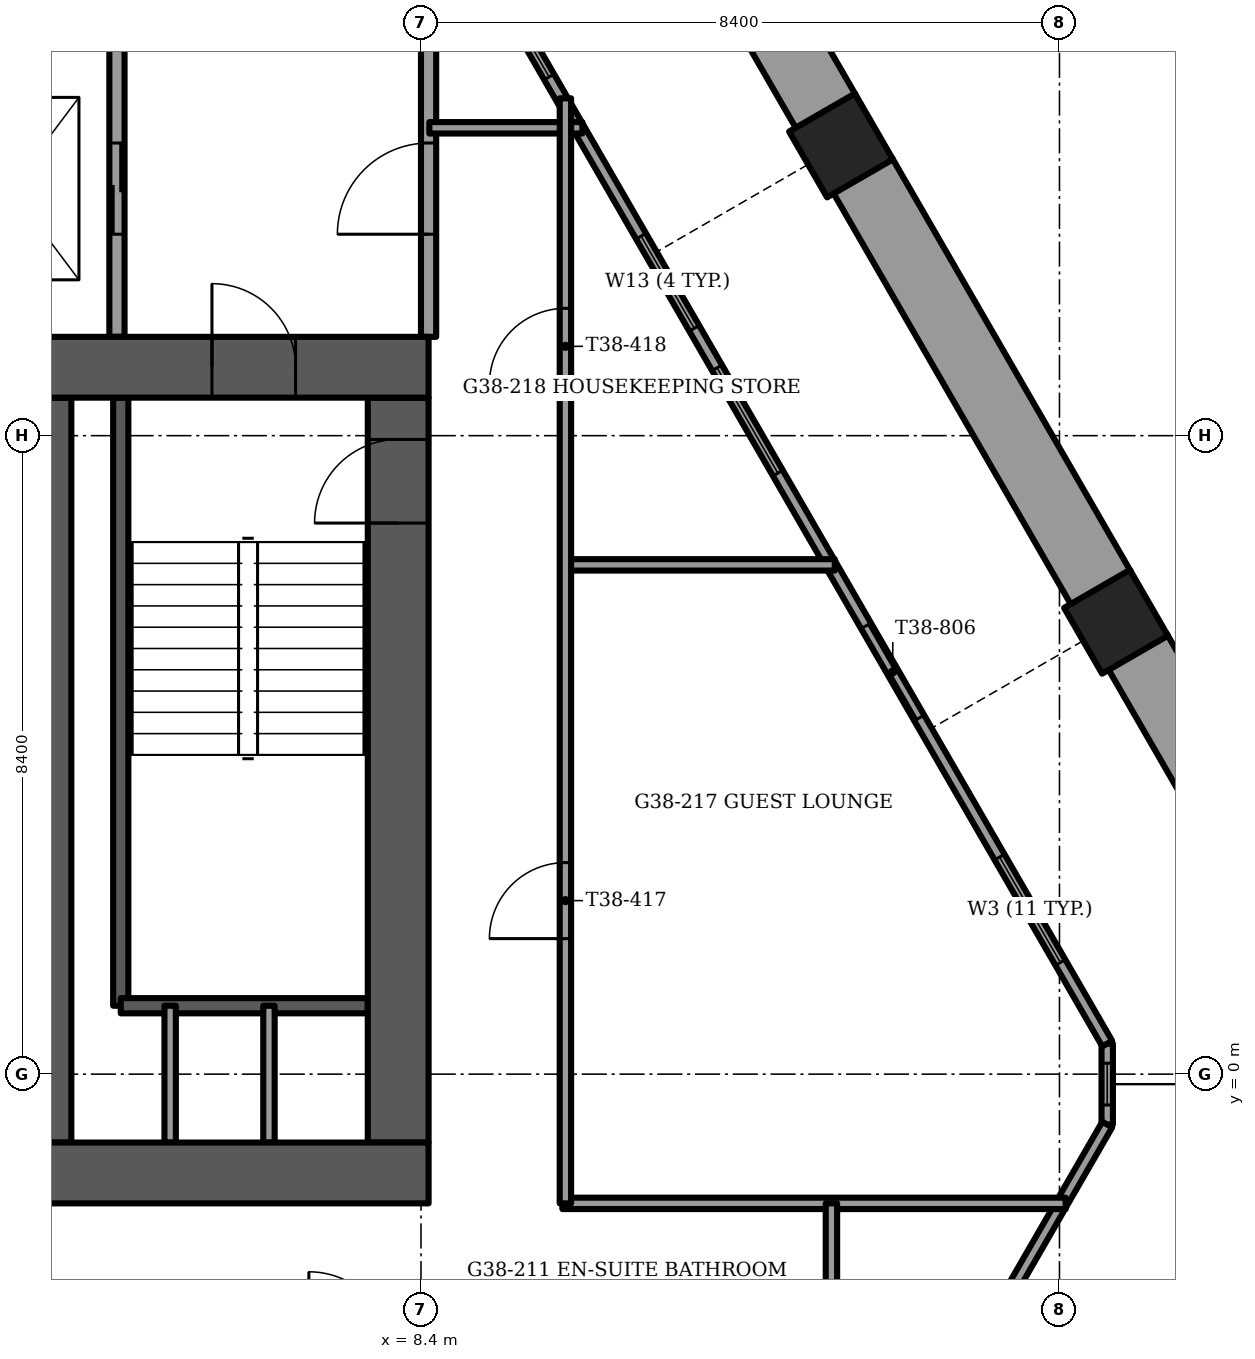
"""IFC4 building model, lengths in metres.
Left out: names, types, materials, properties, quantities, classifications, styles, units other than length and angle.
Written with IfcOpenShell. Run it as: python <this file> out.ifc"""

import sys

from ifc_helpers import new_model, si_unit, direction, frame, frame_2d, origin, origin_2d, place, context, subcontext, project, spatial, rectangle, extrude, element, fill, save


model = new_model("IFC4")
c1 = context("Model", 3, precision=1e-05, world=origin(), true_north=direction((0.0, 1.0)))
c2 = subcontext(c1, "Body", "Model", "MODEL_VIEW")
j1 = project(units=[si_unit("LENGTHUNIT", "METRE"), si_unit("PLANEANGLEUNIT", "RADIAN")], contexts=[c1])
p1 = place(None, origin())
s1 = spatial("IfcSite", under=j1, at=p1, CompositionType="ELEMENT")
p2 = place(p1, origin())
s2 = spatial("IfcBuilding", under=s1, at=p2, CompositionType="ELEMENT")
p3 = place(p2, frame((0.0, 0.0, 157.0)))
s3 = spatial("IfcBuildingStorey", under=s2, at=p3, CompositionType="ELEMENT", Elevation=157.0)
for number, where, z_axis, x_axis in (
    (1, (17.544, 5.951, -1.2), (0.0, 0.0, 1.0), (0.5, -0.866, 0.0)),
    (2, (13.926, 12.218, -1.2), (0.0, 0.0, 1.0), (0.5, -0.866, 0.0)),
):
    element("IfcColumn", number, at=place(p3, frame(where, z_axis=z_axis, x_axis=x_axis)), inside=s3, PredefinedType="COLUMN", context=c2, shape_type="SweptSolid", body=[
        extrude(rectangle(XDim=1.0, YDim=1.0, at=origin_2d()), origin(), (0.0, 0.0, 1.0), 3.75),
    ])
p4 = place(p3, frame((-8.5, -1.3, -0.3), z_axis=(0.0, 0.0, 1.0), x_axis=(1.0, 0.0, 0.0)))
e3 = element("IfcWall", 3, at=p4, inside=s3, PredefinedType="SHEAR", context=c2, shape_type="SweptSolid", body=[
    extrude(rectangle(XDim=17.0, YDim=0.8, at=frame_2d((8.5, 0.0))), origin(), (0.0, 0.0, 1.0), 3.75),
])
p5 = place(p4, frame((7.7, 0.0, 0.0)))
e4 = element("IfcOpeningElement", 4, at=p5, cuts=e3, PredefinedType="OPENING", context=c2, shape_type="SweptSolid", body=[
    extrude(rectangle(XDim=1.6, YDim=2.1, at=frame_2d((0.8, 1.05))), frame((0.0, 0.4, 0.0), z_axis=(0.0, -1.0, 0.0), x_axis=(1.0, 0.0, 0.0)), (0.0, 0.0, 1.0), 0.8),
])
p6 = place(p3, frame((-8.5, 9.3, -0.3), z_axis=(0.0, 0.0, 1.0), x_axis=(1.0, 0.0, 0.0)))
e5 = element("IfcWall", 5, at=p6, inside=s3, PredefinedType="SHEAR", context=c2, shape_type="SweptSolid", body=[
    extrude(rectangle(XDim=17.0, YDim=0.8, at=frame_2d((8.5, 0.0))), origin(), (0.0, 0.0, 1.0), 3.75),
])
p7 = place(p6, frame((7.7, 0.0, 0.0)))
e6 = element("IfcOpeningElement", 6, at=p7, cuts=e5, PredefinedType="OPENING", context=c2, shape_type="SweptSolid", body=[
    extrude(rectangle(XDim=1.6, YDim=2.1, at=frame_2d((0.8, 1.05))), frame((0.0, 0.4, 0.0), z_axis=(0.0, -1.0, 0.0), x_axis=(1.0, 0.0, 0.0)), (0.0, 0.0, 1.0), 0.8),
])
p8 = place(p6, frame((1.75, 0.0, 0.0)))
e7 = element("IfcOpeningElement", 7, at=p8, cuts=e5, PredefinedType="OPENING", context=c2, shape_type="SweptSolid", body=[
    extrude(rectangle(XDim=1.1, YDim=2.1, at=frame_2d((0.55, 1.05))), frame((0.0, 0.4, 0.0), z_axis=(0.0, -1.0, 0.0), x_axis=(1.0, 0.0, 0.0)), (0.0, 0.0, 1.0), 0.8),
])
p9 = place(p6, frame((14.15, 0.0, 0.0)))
e8 = element("IfcOpeningElement", 8, at=p9, cuts=e5, PredefinedType="OPENING", context=c2, shape_type="SweptSolid", body=[
    extrude(rectangle(XDim=1.1, YDim=2.1, at=frame_2d((0.55, 1.05))), frame((0.0, 0.4, 0.0), z_axis=(0.0, -1.0, 0.0), x_axis=(1.0, 0.0, 0.0)), (0.0, 0.0, 1.0), 0.8),
])
p10 = place(p3, frame((8.1, -0.9, -0.3), z_axis=(0.0, 0.0, 1.0), x_axis=(0.0, 1.0, 0.0)))
e9 = element("IfcWall", 9, at=p10, inside=s3, PredefinedType="SHEAR", context=c2, shape_type="SweptSolid", body=[
    extrude(rectangle(XDim=9.8, YDim=0.8, at=frame_2d((4.9, 0.0))), origin(), (0.0, 0.0, 1.0), 3.75),
])
p11 = place(p10, frame((8.15, 0.0, 0.0)))
e10 = element("IfcOpeningElement", 10, at=p11, cuts=e9, PredefinedType="OPENING", context=c2, shape_type="SweptSolid", body=[
    extrude(rectangle(XDim=1.1, YDim=2.1, at=frame_2d((0.55, 1.05))), frame((0.0, 0.4, 0.0), z_axis=(0.0, -1.0, 0.0), x_axis=(1.0, 0.0, 0.0)), (0.0, 0.0, 1.0), 0.8),
])
p12 = place(p3, frame((3.6, -0.9, -0.3), z_axis=(0.0, 0.0, 1.0), x_axis=(0.0, 1.0, 0.0)))
e11 = element("IfcWall", 11, at=p12, inside=s3, PredefinedType="SHEAR", context=c2, shape_type="SweptSolid", body=[
    extrude(rectangle(XDim=9.8, YDim=0.4, at=frame_2d((4.9, 0.0))), origin(), (0.0, 0.0, 1.0), 3.75),
])
p13 = place(p3, frame((17.936, -5.635, 0.0), z_axis=(0.0, 0.0, 1.0), x_axis=(0.500019366424, 0.866014222285, 0.0)))
e12 = element("IfcWall", 12, at=p13, inside=s3, PredefinedType="PARAPET", context=c2, shape_type="SweptSolid", body=[
    extrude(rectangle(XDim=5.813, YDim=0.9, at=frame_2d((2.906, 0.0))), origin(), (0.0, 0.0, 1.0), 1.1),
])
p14 = place(p3, frame((20.842, 0.339, 0.0), z_axis=(0.0, 0.0, 1.0), x_axis=(-0.500012890865, 0.866017961112, 0.0)))
e13 = element("IfcWall", 13, at=p14, inside=s3, PredefinedType="PARAPET", context=c2, shape_type="SweptSolid", body=[
    extrude(rectangle(XDim=6.039, YDim=0.9, at=frame_2d((3.02, 0.0))), origin(), (0.0, 0.0, 1.0), 1.1),
])
p15 = place(p3, frame((17.352, 6.383, 0.0), z_axis=(0.0, 0.0, 1.0), x_axis=(-0.500030142214, 0.86600800047, 0.0)))
e14 = element("IfcWall", 14, at=p15, inside=s3, PredefinedType="PARAPET", context=c2, shape_type="SweptSolid", body=[
    extrude(rectangle(XDim=6.296, YDim=0.9, at=frame_2d((3.148, 0.0))), origin(), (0.0, 0.0, 1.0), 1.1),
])
p16 = place(p3, frame((13.734, 12.65, 0.0), z_axis=(0.0, 0.0, 1.0), x_axis=(-0.499995386674, 0.866028067273, 0.0)))
e15 = element("IfcWall", 15, at=p16, inside=s3, PredefinedType="PARAPET", context=c2, shape_type="SweptSolid", body=[
    extrude(rectangle(XDim=6.04, YDim=0.9, at=frame_2d((3.02, 0.0))), origin(), (0.0, 0.0, 1.0), 1.1),
])
p17 = place(p3, frame((9.289, -14.762, 0.0), z_axis=(0.0, 0.0, 1.0), x_axis=(0.499985985267, 0.866033495043, 0.0)))
e16 = element("IfcWall", 16, at=p17, inside=s3, PredefinedType="SOLIDWALL", context=c2, shape_type="SweptSolid", body=[
    extrude(rectangle(XDim=16.279, YDim=0.15, at=frame_2d((8.14, 0.0))), origin(), (0.0, 0.0, 1.0), 3.45),
])
p18 = place(p17, frame((2.14, 0.0, 0.15)))
e17 = element("IfcOpeningElement", 17, at=p18, cuts=e16, PredefinedType="OPENING", context=c2, shape_type="SweptSolid", body=[
    extrude(rectangle(XDim=1.6, YDim=2.85, at=frame_2d((0.8, 1.425))), frame((0.0, 0.075, 0.0), z_axis=(0.0, -1.0, 0.0), x_axis=(1.0, 0.0, 0.0)), (0.0, 0.0, 1.0), 0.15),
])
p19 = place(p17, frame((4.34, 0.0, 0.0)))
e18 = element("IfcOpeningElement", 18, at=p19, cuts=e16, PredefinedType="OPENING", context=c2, shape_type="SweptSolid", body=[
    extrude(rectangle(XDim=1.4, YDim=2.4, at=frame_2d((0.7, 1.2))), frame((0.0, 0.075, 0.0), z_axis=(0.0, -1.0, 0.0), x_axis=(1.0, 0.0, 0.0)), (0.0, 0.0, 1.0), 0.15),
])
p20 = place(p17, frame((6.34, 0.0, 0.15)))
e19 = element("IfcOpeningElement", 19, at=p20, cuts=e16, PredefinedType="OPENING", context=c2, shape_type="SweptSolid", body=[
    extrude(rectangle(XDim=0.9, YDim=2.85, at=frame_2d((0.45, 1.425))), frame((0.0, 0.075, 0.0), z_axis=(0.0, -1.0, 0.0), x_axis=(1.0, 0.0, 0.0)), (0.0, 0.0, 1.0), 0.15),
])
p21 = place(p17, frame((7.497, 0.0, 0.0)))
e20 = element("IfcOpeningElement", 20, at=p21, cuts=e16, PredefinedType="OPENING", context=c2, shape_type="SweptSolid", body=[
    extrude(rectangle(XDim=1.4, YDim=2.4, at=frame_2d((0.7, 1.2))), frame((0.0, 0.075, 0.0), z_axis=(0.0, -1.0, 0.0), x_axis=(1.0, 0.0, 0.0)), (0.0, 0.0, 1.0), 0.15),
])
p22 = place(p17, frame((10.54, 0.0, 0.15)))
e21 = element("IfcOpeningElement", 21, at=p22, cuts=e16, PredefinedType="OPENING", context=c2, shape_type="SweptSolid", body=[
    extrude(rectangle(XDim=1.6, YDim=2.85, at=frame_2d((0.8, 1.425))), frame((0.0, 0.075, 0.0), z_axis=(0.0, -1.0, 0.0), x_axis=(1.0, 0.0, 0.0)), (0.0, 0.0, 1.0), 0.15),
])
p23 = place(p17, frame((0.502, 0.0, 0.15)))
e22 = element("IfcOpeningElement", 22, at=p23, cuts=e16, PredefinedType="OPENING", context=c2, shape_type="SweptSolid", body=[
    extrude(rectangle(XDim=0.9, YDim=2.73, at=frame_2d((0.45, 1.365))), frame((0.0, 0.075, 0.0), z_axis=(0.0, -1.0, 0.0), x_axis=(1.0, 0.0, 0.0)), (0.0, 0.0, 1.0), 0.15),
])
p24 = place(p3, frame((17.428, 0.402, 0.0), z_axis=(0.0, 0.0, 1.0), x_axis=(-0.500000203029, 0.866025286565, 0.0)))
e23 = element("IfcWall", 23, at=p24, inside=s3, PredefinedType="SOLIDWALL", context=c2, shape_type="SweptSolid", body=[
    extrude(rectangle(XDim=19.504, YDim=0.15, at=frame_2d((9.752, 0.0))), origin(), (0.0, 0.0, 1.0), 3.45),
])
p25 = place(p24, frame((4.947, 0.0, 0.0)))
e24 = element("IfcOpeningElement", 24, at=p25, cuts=e23, PredefinedType="OPENING", context=c2, shape_type="SweptSolid", body=[
    extrude(rectangle(XDim=1.4, YDim=2.4, at=frame_2d((0.7, 1.2))), frame((0.0, 0.075, 0.0), z_axis=(0.0, -1.0, 0.0), x_axis=(1.0, 0.0, 0.0)), (0.0, 0.0, 1.0), 0.15),
])
p26 = place(p24, frame((8.666, 0.0, 0.15)))
e25 = element("IfcOpeningElement", 25, at=p26, cuts=e23, PredefinedType="OPENING", context=c2, shape_type="SweptSolid", body=[
    extrude(rectangle(XDim=1.6, YDim=2.85, at=frame_2d((0.8, 1.425))), frame((0.0, 0.075, 0.0), z_axis=(0.0, -1.0, 0.0), x_axis=(1.0, 0.0, 0.0)), (0.0, 0.0, 1.0), 0.15),
])
p27 = place(p24, frame((10.866, 0.0, 0.15)))
e26 = element("IfcOpeningElement", 26, at=p27, cuts=e23, PredefinedType="OPENING", context=c2, shape_type="SweptSolid", body=[
    extrude(rectangle(XDim=1.4, YDim=2.85, at=frame_2d((0.7, 1.425))), frame((0.0, 0.075, 0.0), z_axis=(0.0, -1.0, 0.0), x_axis=(1.0, 0.0, 0.0)), (0.0, 0.0, 1.0), 0.15),
])
p28 = place(p24, frame((14.684, 0.0, 0.15)))
e27 = element("IfcOpeningElement", 27, at=p28, cuts=e23, PredefinedType="OPENING", context=c2, shape_type="SweptSolid", body=[
    extrude(rectangle(XDim=1.6, YDim=2.85, at=frame_2d((0.8, 1.425))), frame((0.0, 0.075, 0.0), z_axis=(0.0, -1.0, 0.0), x_axis=(1.0, 0.0, 0.0)), (0.0, 0.0, 1.0), 0.15),
])
p29 = place(p24, frame((1.233, 0.0, 0.15)))
e28 = element("IfcOpeningElement", 28, at=p29, cuts=e23, PredefinedType="OPENING", context=c2, shape_type="SweptSolid", body=[
    extrude(rectangle(XDim=1.6, YDim=2.73, at=frame_2d((0.8, 1.365))), frame((0.0, 0.075, 0.0), z_axis=(0.0, -1.0, 0.0), x_axis=(1.0, 0.0, 0.0)), (0.0, 0.0, 1.0), 0.15),
])
p30 = place(p24, frame((18.369, 0.0, 0.15)))
e29 = element("IfcOpeningElement", 29, at=p30, cuts=e23, PredefinedType="OPENING", context=c2, shape_type="SweptSolid", body=[
    extrude(rectangle(XDim=0.9, YDim=2.73, at=frame_2d((0.45, 1.365))), frame((0.0, 0.075, 0.0), z_axis=(0.0, -1.0, 0.0), x_axis=(1.0, 0.0, 0.0)), (0.0, 0.0, 1.0), 0.15),
])
p31 = place(p3, frame((17.428, -0.663, 0.0), z_axis=(0.0, 0.0, 1.0), x_axis=(0.0, 1.0, 0.0)))
e30 = element("IfcWall", 30, at=p31, inside=s3, PredefinedType="SOLIDWALL", context=c2, shape_type="SweptSolid", body=[
    extrude(rectangle(XDim=1.065, YDim=0.15, at=frame_2d((0.532, 0.0))), origin(), (0.0, 0.0, 1.0), 3.45),
])
p32 = place(p31, frame((0.258, 0.0, 0.15)))
e31 = element("IfcOpeningElement", 31, at=p32, cuts=e30, PredefinedType="OPENING", context=c2, shape_type="SweptSolid", body=[
    extrude(rectangle(XDim=0.55, YDim=2.85, at=frame_2d((0.275, 1.425))), frame((0.0, 0.075, 0.0), z_axis=(0.0, -1.0, 0.0), x_axis=(1.0, 0.0, 0.0)), (0.0, 0.0, 1.0), 0.15),
])
p33 = place(p3, frame((4.45, 0.9, -0.3), z_axis=(0.0, 0.0, 1.0), x_axis=(0.0, 1.0, 0.0)))
e32 = element("IfcWall", 32, at=p33, inside=s3, PredefinedType="SOLIDWALL", context=c2, shape_type="SweptSolid", body=[
    extrude(rectangle(XDim=8.0, YDim=0.2, at=frame_2d((4.0, 0.0))), origin(), (0.0, 0.0, 1.0), 3.75),
])
p34 = place(p3, frame((4.45, 0.9, -0.3), z_axis=(0.0, 0.0, 1.0), x_axis=(1.0, 0.0, 0.0)))
e33 = element("IfcWall", 33, at=p34, inside=s3, PredefinedType="SOLIDWALL", context=c2, shape_type="SweptSolid", body=[
    extrude(rectangle(XDim=3.25, YDim=0.2, at=frame_2d((1.625, 0.0))), origin(), (0.0, 0.0, 1.0), 3.75),
])
for number, where, z_axis, x_axis in (
    (34, (5.1, -0.9, 0.0), (0.0, 0.0, 1.0), (0.0, 1.0, 0.0)),
    (35, (6.4, -0.9, 0.0), (0.0, 0.0, 1.0), (0.0, 1.0, 0.0)),
):
    element("IfcWall", number, at=place(p3, frame(where, z_axis=z_axis, x_axis=x_axis)), inside=s3, PredefinedType="PARTITIONING", context=c2, shape_type="SweptSolid", body=[
        extrude(rectangle(XDim=1.8, YDim=0.15, at=frame_2d((0.9, 0.0))), origin(), (0.0, 0.0, 1.0), 3.45),
    ])
p35 = place(p3, frame((8.5, 9.7, 0.0), z_axis=(0.0, 0.0, 1.0), x_axis=(0.0, 1.0, 0.0)))
e36 = element("IfcWall", 36, at=p35, inside=s3, PredefinedType="PARTITIONING", context=c2, shape_type="SweptSolid", body=[
    extrude(rectangle(XDim=3.9, YDim=0.2, at=frame_2d((1.95, 0.0))), origin(), (0.0, 0.0, 1.0), 3.45),
])
p36 = place(p35, frame((1.35, 0.0, 0.0)))
e37 = element("IfcOpeningElement", 37, at=p36, cuts=e36, PredefinedType="OPENING", context=c2, shape_type="SweptSolid", body=[
    extrude(rectangle(XDim=1.2, YDim=2.1, at=frame_2d((0.6, 1.05))), frame((0.0, 0.1, 0.0), z_axis=(0.0, -1.0, 0.0), x_axis=(1.0, 0.0, 0.0)), (0.0, 0.0, 1.0), 0.2),
])
p37 = place(p3, frame((4.4, 9.7, 0.0), z_axis=(0.0, 0.0, 1.0), x_axis=(0.0, 1.0, 0.0)))
e38 = element("IfcWall", 38, at=p37, inside=s3, PredefinedType="PARTITIONING", context=c2, shape_type="SweptSolid", body=[
    extrude(rectangle(XDim=3.9, YDim=0.2, at=frame_2d((1.95, 0.0))), origin(), (0.0, 0.0, 1.0), 3.45),
])
p38 = place(p37, frame((1.35, 0.0, 0.0)))
e39 = element("IfcOpeningElement", 39, at=p38, cuts=e38, PredefinedType="OPENING", context=c2, shape_type="SweptSolid", body=[
    extrude(rectangle(XDim=1.2, YDim=2.1, at=frame_2d((0.6, 1.05))), frame((0.0, 0.1, 0.0), z_axis=(0.0, -1.0, 0.0), x_axis=(1.0, 0.0, 0.0)), (0.0, 0.0, 1.0), 0.2),
])
p39 = place(p3, frame((10.26, -1.7, 0.0), z_axis=(0.0, 0.0, 1.0), x_axis=(1.0, 0.0, 0.0)))
e40 = element("IfcWall", 40, at=p39, inside=s3, PredefinedType="PARTITIONING", context=c2, shape_type="SweptSolid", body=[
    extrude(rectangle(XDim=6.622, YDim=0.15, at=frame_2d((3.311, 0.0))), origin(), (0.0, 0.0, 1.0), 3.45),
])
p40 = place(p3, frame((10.3, 6.7, 0.0), z_axis=(0.0, 0.0, 1.0), x_axis=(1.0, 0.0, 0.0)))
e41 = element("IfcWall", 41, at=p40, inside=s3, PredefinedType="PARTITIONING", context=c2, shape_type="SweptSolid", body=[
    extrude(rectangle(XDim=3.544, YDim=0.15, at=frame_2d((1.772, 0.0))), origin(), (0.0, 0.0, 1.0), 3.45),
])
p41 = place(p3, frame((8.51, 12.45, 0.0), z_axis=(0.0, 0.0, 1.0), x_axis=(1.0, 0.0, 0.0)))
e42 = element("IfcWall", 42, at=p41, inside=s3, PredefinedType="PARTITIONING", context=c2, shape_type="SweptSolid", body=[
    extrude(rectangle(XDim=2.014, YDim=0.15, at=frame_2d((1.007, 0.0))), origin(), (0.0, 0.0, 1.0), 3.45),
])
p42 = place(p3, frame((13.8, -3.7, 0.0), z_axis=(0.0, 0.0, 1.0), x_axis=(0.0, 1.0, 0.0)))
e43 = element("IfcWall", 43, at=p42, inside=s3, PredefinedType="PARTITIONING", context=c2, shape_type="SweptSolid", body=[
    extrude(rectangle(XDim=2.0, YDim=0.15, at=frame_2d((1.0, 0.0))), origin(), (0.0, 0.0, 1.0), 3.45),
])
p43 = place(p3, frame((10.3, -1.7, 0.0), z_axis=(0.0, 0.0, 1.0), x_axis=(0.0, 1.0, 0.0)))
e44 = element("IfcWall", 44, at=p43, inside=s3, PredefinedType="PARTITIONING", context=c2, shape_type="SweptSolid", body=[
    extrude(rectangle(XDim=14.538, YDim=0.15, at=frame_2d((7.269, 0.0))), origin(), (0.0, 0.0, 1.0), 3.45),
])
p44 = place(p43, frame((3.483, 0.0, 0.0)))
e45 = element("IfcOpeningElement", 45, at=p44, cuts=e44, PredefinedType="OPENING", context=c2, shape_type="SweptSolid", body=[
    extrude(rectangle(XDim=1.0, YDim=2.1, at=frame_2d((0.5, 1.05))), frame((0.0, 0.075, 0.0), z_axis=(0.0, -1.0, 0.0), x_axis=(1.0, 0.0, 0.0)), (0.0, 0.0, 1.0), 0.15),
])
p45 = place(p43, frame((10.775, 0.0, 0.0)))
e46 = element("IfcOpeningElement", 46, at=p45, cuts=e44, PredefinedType="OPENING", context=c2, shape_type="SweptSolid", body=[
    extrude(rectangle(XDim=1.0, YDim=2.1, at=frame_2d((0.5, 1.05))), frame((0.0, 0.075, 0.0), z_axis=(0.0, -1.0, 0.0), x_axis=(1.0, 0.0, 0.0)), (0.0, 0.0, 1.0), 0.15),
])
p46 = place(p25, origin())
e47 = element("IfcDoor", 47, at=p46, inside=s3, OperationType="SLIDING_TO_RIGHT", PredefinedType="DOOR", context=c2, shape_type="SweptSolid", body=[
    extrude(rectangle(XDim=1.4, YDim=2.4, at=frame_2d((0.7, 1.2))), frame((0.0, 0.025, 0.0), z_axis=(0.0, -1.0, 0.0), x_axis=(1.0, 0.0, 0.0)), (0.0, 0.0, 1.0), 0.05),
])
fill(e24, e47)
p47 = place(p26, origin())
e48 = element("IfcWindow", 48, at=p47, inside=s3, PartitioningType="SINGLE_PANEL", PredefinedType="WINDOW", context=c2, shape_type="SweptSolid", body=[
    extrude(rectangle(XDim=1.6, YDim=2.85, at=frame_2d((0.8, 1.425))), frame((0.0, 0.03, 0.0), z_axis=(0.0, -1.0, 0.0), x_axis=(1.0, 0.0, 0.0)), (0.0, 0.0, 1.0), 0.06),
])
fill(e25, e48)
p48 = place(p27, origin())
e49 = element("IfcWindow", 49, at=p48, inside=s3, PartitioningType="SINGLE_PANEL", PredefinedType="WINDOW", context=c2, shape_type="SweptSolid", body=[
    extrude(rectangle(XDim=1.4, YDim=2.85, at=frame_2d((0.7, 1.425))), frame((0.0, 0.03, 0.0), z_axis=(0.0, -1.0, 0.0), x_axis=(1.0, 0.0, 0.0)), (0.0, 0.0, 1.0), 0.06),
])
fill(e26, e49)
p49 = place(p28, origin())
e50 = element("IfcWindow", 50, at=p49, inside=s3, PartitioningType="SINGLE_PANEL", PredefinedType="WINDOW", context=c2, shape_type="SweptSolid", body=[
    extrude(rectangle(XDim=1.6, YDim=2.85, at=frame_2d((0.8, 1.425))), frame((0.0, 0.03, 0.0), z_axis=(0.0, -1.0, 0.0), x_axis=(1.0, 0.0, 0.0)), (0.0, 0.0, 1.0), 0.06),
])
fill(e27, e50)
p50 = place(p29, origin())
e51 = element("IfcWindow", 51, at=p50, inside=s3, PartitioningType="SINGLE_PANEL", PredefinedType="WINDOW", context=c2, shape_type="SweptSolid", body=[
    extrude(rectangle(XDim=1.6, YDim=2.73, at=frame_2d((0.8, 1.365))), frame((0.0, 0.03, 0.0), z_axis=(0.0, -1.0, 0.0), x_axis=(1.0, 0.0, 0.0)), (0.0, 0.0, 1.0), 0.06),
])
fill(e28, e51)
p51 = place(p32, origin())
e52 = element("IfcWindow", 52, at=p51, inside=s3, PartitioningType="SINGLE_PANEL", PredefinedType="WINDOW", context=c2, shape_type="SweptSolid", body=[
    extrude(rectangle(XDim=0.55, YDim=2.85, at=frame_2d((0.275, 1.425))), frame((0.0, 0.03, 0.0), z_axis=(0.0, -1.0, 0.0), x_axis=(1.0, 0.0, 0.0)), (0.0, 0.0, 1.0), 0.06),
])
fill(e31, e52)
p52 = place(p9, origin())
e53 = element("IfcDoor", 53, at=p52, inside=s3, OperationType="SINGLE_SWING_RIGHT", PredefinedType="DOOR", context=c2, shape_type="SweptSolid", body=[
    extrude(rectangle(XDim=1.1, YDim=2.1, at=frame_2d((0.55, 1.05))), frame((0.0, 0.025, 0.0), z_axis=(0.0, -1.0, 0.0), x_axis=(1.0, 0.0, 0.0)), (0.0, 0.0, 1.0), 0.05),
])
fill(e8, e53)
p53 = place(p11, origin())
e54 = element("IfcDoor", 54, at=p53, inside=s3, OperationType="SINGLE_SWING_LEFT", PredefinedType="DOOR", context=c2, shape_type="SweptSolid", body=[
    extrude(rectangle(XDim=1.1, YDim=2.1, at=frame_2d((0.55, 1.05))), frame((0.0, 0.025, 0.0), z_axis=(0.0, -1.0, 0.0), x_axis=(1.0, 0.0, 0.0)), (0.0, 0.0, 1.0), 0.05),
])
fill(e10, e54)
p54 = place(p38, origin())
e55 = element("IfcDoor", 55, at=p54, inside=s3, OperationType="SLIDING_TO_LEFT", PredefinedType="DOOR", context=c2, shape_type="SweptSolid", body=[
    extrude(rectangle(XDim=1.2, YDim=2.1, at=frame_2d((0.6, 1.05))), frame((0.0, 0.025, 0.0), z_axis=(0.0, -1.0, 0.0), x_axis=(1.0, 0.0, 0.0)), (0.0, 0.0, 1.0), 0.05),
])
fill(e39, e55)
p55 = place(p36, origin())
e56 = element("IfcDoor", 56, at=p55, inside=s3, OperationType="SINGLE_SWING_LEFT", PredefinedType="DOOR", context=c2, shape_type="SweptSolid", body=[
    extrude(rectangle(XDim=1.2, YDim=2.1, at=frame_2d((0.6, 1.05))), frame((0.0, 0.025, 0.0), z_axis=(0.0, -1.0, 0.0), x_axis=(1.0, 0.0, 0.0)), (0.0, 0.0, 1.0), 0.05),
])
fill(e37, e56)
p56 = place(p44, origin())
e57 = element("IfcDoor", 57, at=p56, inside=s3, OperationType="SINGLE_SWING_LEFT", PredefinedType="DOOR", context=c2, shape_type="SweptSolid", body=[
    extrude(rectangle(XDim=1.0, YDim=2.1, at=frame_2d((0.5, 1.05))), frame((0.0, 0.025, 0.0), z_axis=(0.0, -1.0, 0.0), x_axis=(1.0, 0.0, 0.0)), (0.0, 0.0, 1.0), 0.05),
])
fill(e45, e57)
p57 = place(p45, origin())
e58 = element("IfcDoor", 58, at=p57, inside=s3, OperationType="SINGLE_SWING_LEFT", PredefinedType="DOOR", context=c2, shape_type="SweptSolid", body=[
    extrude(rectangle(XDim=1.0, YDim=2.1, at=frame_2d((0.5, 1.05))), frame((0.0, 0.025, 0.0), z_axis=(0.0, -1.0, 0.0), x_axis=(1.0, 0.0, 0.0)), (0.0, 0.0, 1.0), 0.05),
])
fill(e46, e58)
save(model, sys.argv[1])
